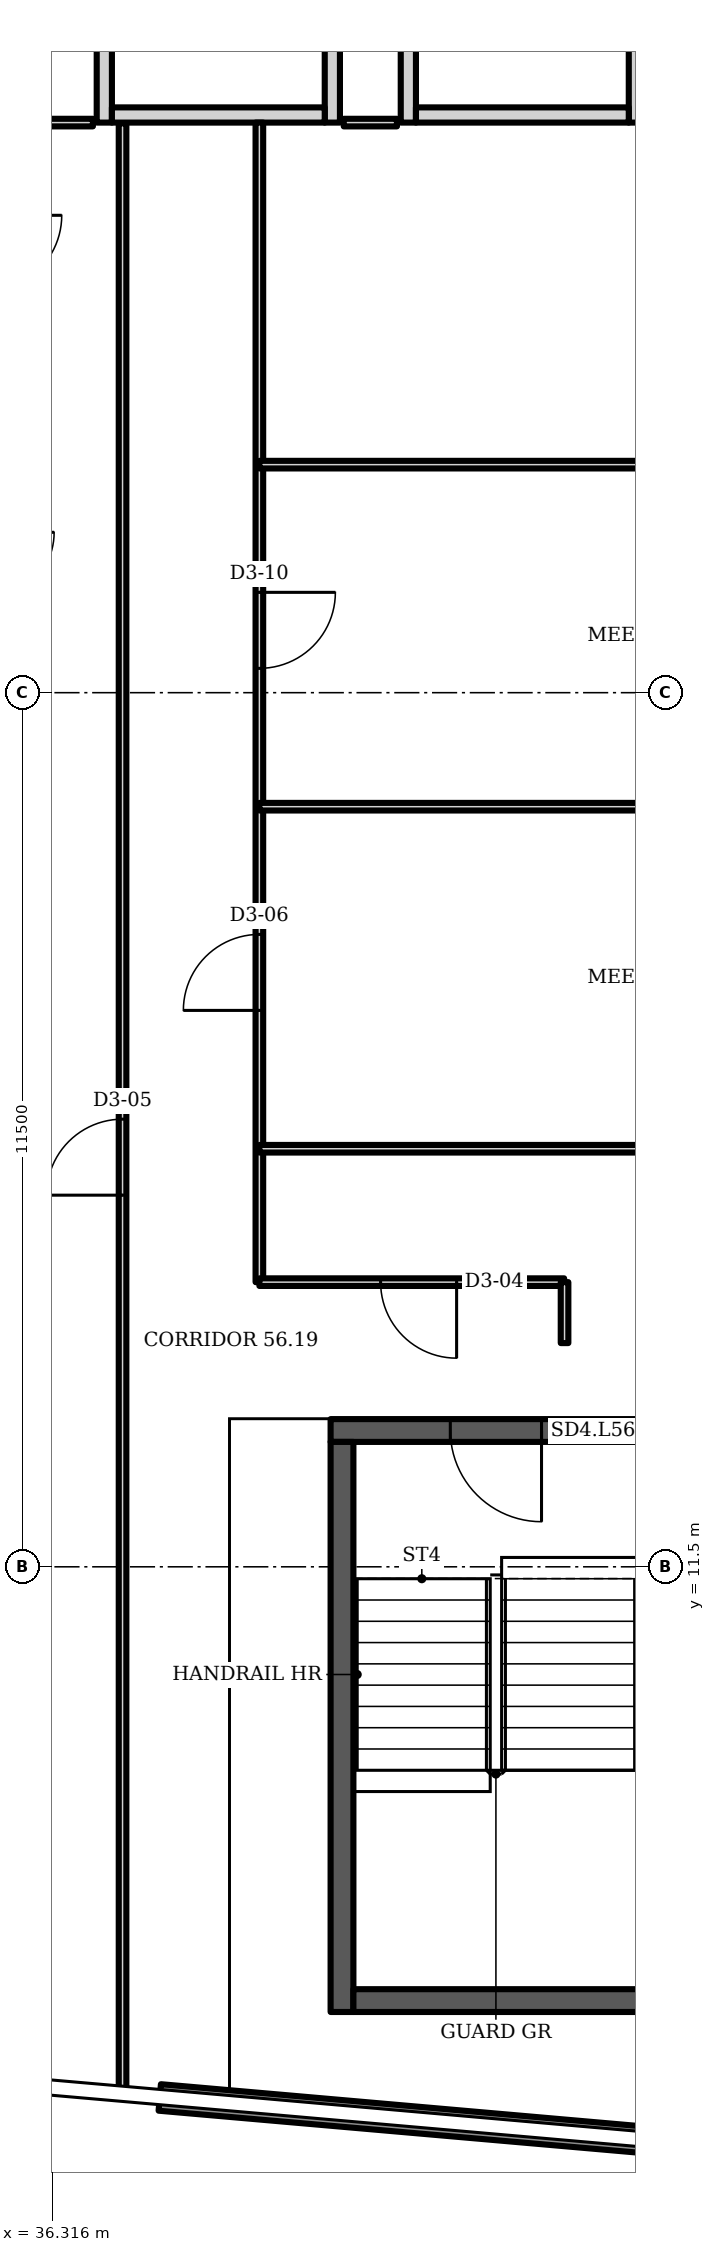
"""IFC4 building model, lengths in metres.
Left out: names, types, materials, properties, quantities, classifications, styles, units other than length and angle.
Written with IfcOpenShell. Run it as: python <this file> out.ifc"""

import sys

from ifc_helpers import new_model, si_unit, direction, frame, frame_2d, origin, place, context, subcontext, project, spatial, rectangle, extrude, element, fill, save


model = new_model("IFC4")
c1 = context("Model", 3, precision=1e-05, world=origin(), true_north=direction((0.0, 1.0)))
c2 = subcontext(c1, "Body", "Model", "MODEL_VIEW")
j1 = project(units=[si_unit("LENGTHUNIT", "METRE"), si_unit("PLANEANGLEUNIT", "RADIAN")], contexts=[c1])
p1 = place(None, origin())
s1 = spatial("IfcSite", under=j1, at=p1, CompositionType="ELEMENT")
p2 = place(p1, origin())
s2 = spatial("IfcBuilding", under=s1, at=p2, CompositionType="ELEMENT")
p3 = place(p2, frame((0.0, 0.0, 225.1)))
s3 = spatial("IfcBuildingStorey", under=s2, at=p3, CompositionType="ELEMENT", Elevation=225.1)
p4 = place(p3, frame((37.729, 4.519, 0.0), z_axis=(0.0, 0.0, 1.0), x_axis=(0.99619, -0.087167, 0.0)))
e1 = element("IfcWall", 1, at=p4, inside=s3, PredefinedType="SOLIDWALL", context=c2, shape_type="SweptSolid", body=[
    extrude(rectangle(XDim=11.831, YDim=0.35, at=frame_2d((5.915, 0.0))), origin(), (0.0, 0.0, 1.0), 1.0),
])
p5 = place(p3, frame((37.0, 30.5, 0.0), z_axis=(0.0, 0.0, 1.0), x_axis=(0.0, 1.0, 0.0)))
e2 = element("IfcWall", 2, at=p5, inside=s3, PredefinedType="PARTITIONING", context=c2, shape_type="SweptSolid", body=[
    extrude(rectangle(XDim=3.5, YDim=0.2, at=frame_2d((1.75, 0.0))), origin(), (0.0, 0.0, 1.0), 3.2),
])
p6 = place(p5, frame((1.2, 0.0, 0.0)))
e3 = element("IfcOpeningElement", 3, at=p6, cuts=e2, PredefinedType="OPENING", context=c2, shape_type="SweptSolid", body=[
    extrude(rectangle(XDim=1.1, YDim=2.1, at=frame_2d((0.55, 1.05))), frame((0.0, 0.11, 0.0), z_axis=(0.0, -1.0, 0.0), x_axis=(1.0, 0.0, 0.0)), (0.0, 0.0, 1.0), 0.22),
])
p7 = place(p3, frame((40.0, 30.5, 0.0), z_axis=(0.0, 0.0, 1.0), x_axis=(0.0, 1.0, 0.0)))
e4 = element("IfcWall", 4, at=p7, inside=s3, PredefinedType="PARTITIONING", context=c2, shape_type="SweptSolid", body=[
    extrude(rectangle(XDim=3.5, YDim=0.2, at=frame_2d((1.75, 0.0))), origin(), (0.0, 0.0, 1.0), 3.2),
])
p8 = place(p3, frame((37.1, 30.6, 0.0), z_axis=(0.0, 0.0, 1.0), x_axis=(1.0, 0.0, 0.0)))
e5 = element("IfcWall", 5, at=p8, inside=s3, PredefinedType="PARTITIONING", context=c2, shape_type="SweptSolid", body=[
    extrude(rectangle(XDim=2.8, YDim=0.2, at=frame_2d((1.4, 0.0))), origin(), (0.0, 0.0, 1.0), 3.2),
])
p9 = place(p3, frame((41.0, 30.5, 0.0), z_axis=(0.0, 0.0, 1.0), x_axis=(0.0, 1.0, 0.0)))
e6 = element("IfcWall", 6, at=p9, inside=s3, PredefinedType="PARTITIONING", context=c2, shape_type="SweptSolid", body=[
    extrude(rectangle(XDim=3.5, YDim=0.2, at=frame_2d((1.75, 0.0))), origin(), (0.0, 0.0, 1.0), 3.2),
])
p10 = place(p3, frame((44.0, 30.5, 0.0), z_axis=(0.0, 0.0, 1.0), x_axis=(0.0, 1.0, 0.0)))
e7 = element("IfcWall", 7, at=p10, inside=s3, PredefinedType="PARTITIONING", context=c2, shape_type="SweptSolid", body=[
    extrude(rectangle(XDim=3.5, YDim=0.2, at=frame_2d((1.75, 0.0))), origin(), (0.0, 0.0, 1.0), 3.2),
])
p11 = place(p10, frame((1.2, 0.0, 0.0)))
e8 = element("IfcOpeningElement", 8, at=p11, cuts=e7, PredefinedType="OPENING", context=c2, shape_type="SweptSolid", body=[
    extrude(rectangle(XDim=1.1, YDim=2.1, at=frame_2d((0.55, 1.05))), frame((0.0, 0.11, 0.0), z_axis=(0.0, -1.0, 0.0), x_axis=(1.0, 0.0, 0.0)), (0.0, 0.0, 1.0), 0.22),
])
p12 = place(p3, frame((41.1, 30.6, 0.0), z_axis=(0.0, 0.0, 1.0), x_axis=(1.0, 0.0, 0.0)))
e9 = element("IfcWall", 9, at=p12, inside=s3, PredefinedType="PARTITIONING", context=c2, shape_type="SweptSolid", body=[
    extrude(rectangle(XDim=2.8, YDim=0.2, at=frame_2d((1.4, 0.0))), origin(), (0.0, 0.0, 1.0), 3.2),
])
p13 = place(p3, frame((39.977, 13.293, 0.0), z_axis=(0.0, 0.0, 1.0), x_axis=(1.0, 0.0, 0.0)))
e10 = element("IfcWall", 10, at=p13, inside=s3, PredefinedType="SHEAR", context=c2, shape_type="SweptSolid", body=[
    extrude(rectangle(XDim=4.35, YDim=0.3, at=frame_2d((2.175, 0.0))), origin(), (0.0, 0.0, 1.0), 3.2),
])
p14 = place(p13, frame((1.575, 0.0, 0.0)))
e11 = element("IfcOpeningElement", 11, at=p14, cuts=e10, PredefinedType="OPENING", context=c2, shape_type="SweptSolid", body=[
    extrude(rectangle(XDim=1.2, YDim=2.1, at=frame_2d((0.6, 1.05))), frame((0.0, 0.16, 0.0), z_axis=(0.0, -1.0, 0.0), x_axis=(1.0, 0.0, 0.0)), (0.0, 0.0, 1.0), 0.32),
])
p15 = place(p3, frame((24.8, 30.5, 0.0), z_axis=(0.0, 0.0, 1.0), x_axis=(1.0, 0.0, 0.0)))
e12 = element("IfcWall", 12, at=p15, inside=s3, PredefinedType="PARTITIONING", context=c2, shape_type="SweptSolid", body=[
    extrude(rectangle(XDim=12.05, YDim=0.1, at=frame_2d((6.025, 0.0))), origin(), (0.0, 0.0, 1.0), 3.2),
])
p16 = place(p3, frame((37.24, 4.587, 0.0), z_axis=(0.0, 0.0, 1.0), x_axis=(0.0, 1.0, 0.0)))
e13 = element("IfcWall", 13, at=p16, inside=s3, PredefinedType="PARTITIONING", context=c2, shape_type="SweptSolid", body=[
    extrude(rectangle(XDim=25.903, YDim=0.1, at=frame_2d((12.952, 0.0))), origin(), (0.0, 0.0, 1.0), 2.58),
])
p17 = place(p16, frame((11.802, 0.0, 0.0)))
e14 = element("IfcOpeningElement", 14, at=p17, cuts=e13, PredefinedType="OPENING", context=c2, shape_type="SweptSolid", body=[
    extrude(rectangle(XDim=1.0, YDim=2.1, at=frame_2d((0.5, 1.05))), frame((0.0, 0.06, 0.0), z_axis=(0.0, -1.0, 0.0), x_axis=(1.0, 0.0, 0.0)), (0.0, 0.0, 1.0), 0.12),
])
p18 = place(p3, frame((39.04, 15.245, 0.0), z_axis=(0.0, 0.0, 1.0), x_axis=(0.0, 1.0, 0.0)))
e15 = element("IfcWall", 15, at=p18, inside=s3, PredefinedType="PARTITIONING", context=c2, shape_type="SweptSolid", body=[
    extrude(rectangle(XDim=15.255, YDim=0.1, at=frame_2d((7.627, 0.0))), origin(), (0.0, 0.0, 1.0), 3.2),
])
p19 = place(p18, frame((3.575, 0.0, 0.0)))
e16 = element("IfcOpeningElement", 16, at=p19, cuts=e15, PredefinedType="OPENING", context=c2, shape_type="SweptSolid", body=[
    extrude(rectangle(XDim=1.0, YDim=2.1, at=frame_2d((0.5, 1.05))), frame((0.0, 0.06, 0.0), z_axis=(0.0, -1.0, 0.0), x_axis=(1.0, 0.0, 0.0)), (0.0, 0.0, 1.0), 0.12),
])
p20 = place(p18, frame((8.075, 0.0, 0.0)))
e17 = element("IfcOpeningElement", 17, at=p20, cuts=e15, PredefinedType="OPENING", context=c2, shape_type="SweptSolid", body=[
    extrude(rectangle(XDim=1.0, YDim=2.1, at=frame_2d((0.5, 1.05))), frame((0.0, 0.06, 0.0), z_axis=(0.0, -1.0, 0.0), x_axis=(1.0, 0.0, 0.0)), (0.0, 0.0, 1.0), 0.12),
])
p21 = place(p3, frame((39.04, 15.245, 0.0), z_axis=(0.0, 0.0, 1.0), x_axis=(1.0, 0.0, 0.0)))
e18 = element("IfcWall", 18, at=p21, inside=s3, PredefinedType="PARTITIONING", context=c2, shape_type="SweptSolid", body=[
    extrude(rectangle(XDim=4.01, YDim=0.1, at=frame_2d((2.005, 0.0))), origin(), (0.0, 0.0, 1.0), 3.2),
])
p22 = place(p21, frame((1.595, 0.0, 0.0)))
e19 = element("IfcOpeningElement", 19, at=p22, cuts=e18, PredefinedType="OPENING", context=c2, shape_type="SweptSolid", body=[
    extrude(rectangle(XDim=1.0, YDim=2.1, at=frame_2d((0.5, 1.05))), frame((0.0, 0.06, 0.0), z_axis=(0.0, -1.0, 0.0), x_axis=(1.0, 0.0, 0.0)), (0.0, 0.0, 1.0), 0.12),
])
p23 = place(p3, frame((39.04, 17.0, 0.0), z_axis=(0.0, 0.0, 1.0), x_axis=(1.0, 0.0, 0.0)))
e20 = element("IfcWall", 20, at=p23, inside=s3, PredefinedType="PARTITIONING", context=c2, shape_type="SweptSolid", body=[
    extrude(rectangle(XDim=22.54, YDim=0.1, at=frame_2d((11.27, 0.0))), origin(), (0.0, 0.0, 1.0), 3.2),
])
for number, where, z_axis, x_axis in (
    (21, (39.04, 21.5, 0.0), (0.0, 0.0, 1.0), (1.0, 0.0, 0.0)),
    (22, (39.04, 26.0, 0.0), (0.0, 0.0, 1.0), (1.0, 0.0, 0.0)),
):
    element("IfcWall", number, at=place(p3, frame(where, z_axis=z_axis, x_axis=x_axis)), inside=s3, PredefinedType="PARTITIONING", context=c2, shape_type="SweptSolid", body=[
        extrude(rectangle(XDim=11.71, YDim=0.1, at=frame_2d((5.855, 0.0))), origin(), (0.0, 0.0, 1.0), 3.2),
    ])
p24 = place(p3, frame((40.15, 30.5, 0.0), z_axis=(0.0, 0.0, 1.0), x_axis=(1.0, 0.0, 0.0)))
e23 = element("IfcWall", 23, at=p24, inside=s3, PredefinedType="PARTITIONING", context=c2, shape_type="SweptSolid", body=[
    extrude(rectangle(XDim=0.7, YDim=0.1, at=frame_2d((0.35, 0.0))), origin(), (0.0, 0.0, 1.0), 3.2),
])
p25 = place(p3, frame((43.055, 14.443, 0.0), z_axis=(0.0, 0.0, 1.0), x_axis=(0.0, 1.0, 0.0)))
e24 = element("IfcWall", 24, at=p25, inside=s3, PredefinedType="PARTITIONING", context=c2, shape_type="SweptSolid", body=[
    extrude(rectangle(XDim=0.802, YDim=0.1, at=frame_2d((0.401, 0.0))), origin(), (0.0, 0.0, 1.0), 3.2),
])
p26 = place(p3, frame((40.127, 5.643, 0.0), z_axis=(0.0, 0.0, 1.0), x_axis=(0.0, 1.0, 0.0)))
e25 = element("IfcWall", 25, at=p26, inside=s3, PredefinedType="SHEAR", context=c2, shape_type="SweptSolid", body=[
    extrude(rectangle(XDim=7.5, YDim=0.3, at=frame_2d((3.75, 0.0))), origin(), (0.0, 0.0, 1.0), 3.2),
])
p27 = place(p3, frame((40.277, 5.793, 0.0), z_axis=(0.0, 0.0, 1.0), x_axis=(1.0, 0.0, 0.0)))
e26 = element("IfcWall", 26, at=p27, inside=s3, PredefinedType="SHEAR", context=c2, shape_type="SweptSolid", body=[
    extrude(rectangle(XDim=3.75, YDim=0.3, at=frame_2d((1.875, 0.0))), origin(), (0.0, 0.0, 1.0), 3.2),
])
p28 = place(p14, origin())
e27 = element("IfcDoor", 27, at=p28, inside=s3, OperationType="SINGLE_SWING_RIGHT", PredefinedType="DOOR", context=c2, shape_type="SweptSolid", body=[
    extrude(rectangle(XDim=1.2, YDim=2.1, at=frame_2d((0.6, 1.05))), frame((0.0, 0.025, 0.0), z_axis=(0.0, -1.0, 0.0), x_axis=(1.0, 0.0, 0.0)), (0.0, 0.0, 1.0), 0.05),
])
fill(e11, e27)
p29 = place(p22, origin())
e28 = element("IfcDoor", 28, at=p29, inside=s3, OperationType="SINGLE_SWING_RIGHT", PredefinedType="DOOR", context=c2, shape_type="SweptSolid", body=[
    extrude(rectangle(XDim=1.0, YDim=2.1, at=frame_2d((0.5, 1.05))), frame((0.0, 0.025, 0.0), z_axis=(0.0, -1.0, 0.0), x_axis=(1.0, 0.0, 0.0)), (0.0, 0.0, 1.0), 0.05),
])
fill(e19, e28)
p30 = place(p17, origin())
e29 = element("IfcDoor", 29, at=p30, inside=s3, OperationType="SINGLE_SWING_LEFT", PredefinedType="DOOR", context=c2, shape_type="SweptSolid", body=[
    extrude(rectangle(XDim=1.0, YDim=2.1, at=frame_2d((0.5, 1.05))), frame((0.0, 0.025, 0.0), z_axis=(0.0, -1.0, 0.0), x_axis=(1.0, 0.0, 0.0)), (0.0, 0.0, 1.0), 0.05),
])
fill(e14, e29)
p31 = place(p19, origin())
e30 = element("IfcDoor", 30, at=p31, inside=s3, OperationType="SINGLE_SWING_LEFT", PredefinedType="DOOR", context=c2, shape_type="SweptSolid", body=[
    extrude(rectangle(XDim=1.0, YDim=2.1, at=frame_2d((0.5, 1.05))), frame((0.0, 0.025, 0.0), z_axis=(0.0, -1.0, 0.0), x_axis=(1.0, 0.0, 0.0)), (0.0, 0.0, 1.0), 0.05),
])
fill(e16, e30)
p32 = place(p20, origin())
e31 = element("IfcDoor", 31, at=p32, inside=s3, OperationType="SINGLE_SWING_RIGHT", PredefinedType="DOOR", context=c2, shape_type="SweptSolid", body=[
    extrude(rectangle(XDim=1.0, YDim=2.1, at=frame_2d((0.5, 1.05))), frame((0.0, 0.025, 0.0), z_axis=(0.0, -1.0, 0.0), x_axis=(1.0, 0.0, 0.0)), (0.0, 0.0, 1.0), 0.05),
])
fill(e17, e31)
save(model, sys.argv[1])
